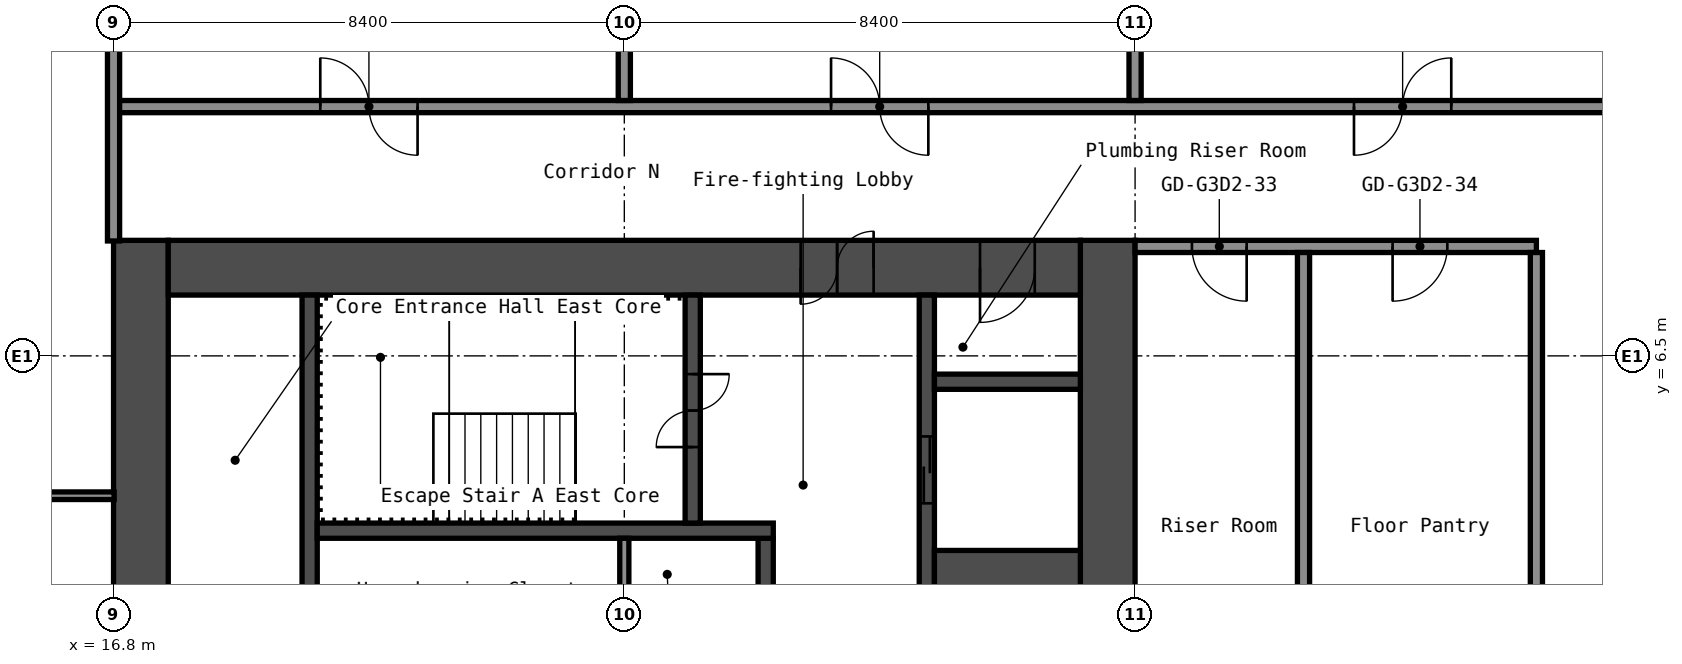
"""IFC4 building model, lengths in metres.
Left out: names, types, materials, properties, quantities, classifications, styles, units other than length and angle.
Written with IfcOpenShell. Run it as: python <this file> out.ifc"""

import sys

from ifc_helpers import new_model, si_unit, direction, frame, frame_2d, origin, place, context, subcontext, project, spatial, rectangle, extrude, element, fill, save


model = new_model("IFC4")
c1 = context("Model", 3, precision=1e-05, world=origin(), true_north=direction((0.0, 1.0)))
c2 = subcontext(c1, "Body", "Model", "MODEL_VIEW")
j1 = project(units=[si_unit("LENGTHUNIT", "METRE"), si_unit("PLANEANGLEUNIT", "RADIAN")], contexts=[c1])
p1 = place(None, origin())
s1 = spatial("IfcSite", under=j1, at=p1, CompositionType="ELEMENT")
p2 = place(p1, origin())
s2 = spatial("IfcBuilding", under=s1, at=p2, CompositionType="ELEMENT")
p3 = place(p2, frame((0.0, 0.0, 172.6)))
s3 = spatial("IfcBuildingStorey", under=s2, at=p3, CompositionType="ELEMENT", Elevation=172.6)
p4 = place(p3, frame((17.25, -8.4, 0.0), z_axis=(0.0, 0.0, 1.0), x_axis=(0.0, 1.0, 0.0)))
e1 = element("IfcWall", 1, at=p4, inside=s3, PredefinedType="SHEAR", context=c2, shape_type="SweptSolid", body=[
    extrude(rectangle(XDim=16.8, YDim=0.9, at=frame_2d((8.4, 0.0))), origin(), (0.0, 0.0, 1.0), 2.9),
])
p5 = place(p4, frame((7.1, 0.0, 0.0)))
e2 = element("IfcOpeningElement", 2, at=p5, cuts=e1, PredefinedType="OPENING", context=c2, shape_type="SweptSolid", body=[
    extrude(rectangle(XDim=1.6, YDim=2.1, at=frame_2d((0.8, 1.05))), frame((0.0, 0.46, 0.0), z_axis=(0.0, -1.0, 0.0), x_axis=(1.0, 0.0, 0.0)), (0.0, 0.0, 1.0), 0.92),
])
p6 = place(p3, frame((33.15, -8.4, 0.0), z_axis=(0.0, 0.0, 1.0), x_axis=(0.0, 1.0, 0.0)))
e3 = element("IfcWall", 3, at=p6, inside=s3, PredefinedType="SHEAR", context=c2, shape_type="SweptSolid", body=[
    extrude(rectangle(XDim=16.8, YDim=0.9, at=frame_2d((8.4, 0.0))), origin(), (0.0, 0.0, 1.0), 2.9),
])
p7 = place(p3, frame((17.7, 7.95, 0.0), z_axis=(0.0, 0.0, 1.0), x_axis=(1.0, 0.0, 0.0)))
e4 = element("IfcWall", 4, at=p7, inside=s3, PredefinedType="SHEAR", context=c2, shape_type="SweptSolid", body=[
    extrude(rectangle(XDim=15.0, YDim=0.9, at=frame_2d((7.5, 0.0))), origin(), (0.0, 0.0, 1.0), 2.9),
])
p8 = place(p7, frame((10.4, 0.0, 0.0)))
e5 = element("IfcOpeningElement", 5, at=p8, cuts=e4, PredefinedType="OPENING", context=c2, shape_type="SweptSolid", body=[
    extrude(rectangle(XDim=1.2, YDim=2.1, at=frame_2d((0.6, 1.05))), frame((0.0, 0.46, 0.0), z_axis=(0.0, -1.0, 0.0), x_axis=(1.0, 0.0, 0.0)), (0.0, 0.0, 1.0), 0.92),
])
p9 = place(p7, frame((13.35, 0.0, 0.0)))
e6 = element("IfcOpeningElement", 6, at=p9, cuts=e4, PredefinedType="OPENING", context=c2, shape_type="SweptSolid", body=[
    extrude(rectangle(XDim=0.9, YDim=2.1, at=frame_2d((0.45, 1.05))), frame((0.0, 0.46, 0.0), z_axis=(0.0, -1.0, 0.0), x_axis=(1.0, 0.0, 0.0)), (0.0, 0.0, 1.0), 0.92),
])
p10 = place(p3, frame((20.025, 1.2, 0.0), z_axis=(0.0, 0.0, 1.0), x_axis=(0.0, 1.0, 0.0)))
e7 = element("IfcWall", 7, at=p10, inside=s3, PredefinedType="SHEAR", context=c2, shape_type="SweptSolid", body=[
    extrude(rectangle(XDim=6.3, YDim=0.25, at=frame_2d((3.15, 0.0))), origin(), (0.0, 0.0, 1.0), 2.9),
])
p11 = place(p3, frame((27.525, 1.45, 0.0), z_axis=(0.0, 0.0, 1.0), x_axis=(0.0, 1.0, 0.0)))
e8 = element("IfcWall", 8, at=p11, inside=s3, PredefinedType="SHEAR", context=c2, shape_type="SweptSolid", body=[
    extrude(rectangle(XDim=2.05, YDim=0.25, at=frame_2d((1.025, 0.0))), origin(), (0.0, 0.0, 1.0), 2.9),
])
p12 = place(p3, frame((20.15, 3.625, 0.0), z_axis=(0.0, 0.0, 1.0), x_axis=(1.0, 0.0, 0.0)))
e9 = element("IfcWall", 9, at=p12, inside=s3, PredefinedType="SHEAR", context=c2, shape_type="SweptSolid", body=[
    extrude(rectangle(XDim=7.5, YDim=0.25, at=frame_2d((3.75, 0.0))), origin(), (0.0, 0.0, 1.0), 2.9),
])
p13 = place(p3, frame((26.325, 3.75, 0.0), z_axis=(0.0, 0.0, 1.0), x_axis=(0.0, 1.0, 0.0)))
e10 = element("IfcWall", 10, at=p13, inside=s3, PredefinedType="SHEAR", context=c2, shape_type="SweptSolid", body=[
    extrude(rectangle(XDim=3.75, YDim=0.25, at=frame_2d((1.875, 0.0))), origin(), (0.0, 0.0, 1.0), 2.9),
])
p14 = place(p13, frame((1.25, 0.0, 0.0)))
e11 = element("IfcOpeningElement", 11, at=p14, cuts=e10, PredefinedType="OPENING", context=c2, shape_type="SweptSolid", body=[
    extrude(rectangle(XDim=1.2, YDim=2.1, at=frame_2d((0.6, 1.05))), frame((0.0, 0.135, 0.0), z_axis=(0.0, -1.0, 0.0), x_axis=(1.0, 0.0, 0.0)), (0.0, 0.0, 1.0), 0.27),
])
p15 = place(p3, frame((30.175, 1.45, 0.0), z_axis=(0.0, 0.0, 1.0), x_axis=(0.0, 1.0, 0.0)))
e12 = element("IfcWall", 12, at=p15, inside=s3, PredefinedType="SHEAR", context=c2, shape_type="SweptSolid", body=[
    extrude(rectangle(XDim=6.05, YDim=0.25, at=frame_2d((3.025, 0.0))), origin(), (0.0, 0.0, 1.0), 2.9),
])
p16 = place(p15, frame((2.625, 0.0, 0.0)))
e13 = element("IfcOpeningElement", 13, at=p16, cuts=e12, PredefinedType="OPENING", context=c2, shape_type="SweptSolid", body=[
    extrude(rectangle(XDim=1.1, YDim=2.1, at=frame_2d((0.55, 1.05))), frame((0.0, 0.135, 0.0), z_axis=(0.0, -1.0, 0.0), x_axis=(1.0, 0.0, 0.0)), (0.0, 0.0, 1.0), 0.27),
])
p17 = place(p3, frame((30.3, 2.375, 0.0), z_axis=(0.0, 0.0, 1.0), x_axis=(1.0, 0.0, 0.0)))
e14 = element("IfcWall", 14, at=p17, inside=s3, PredefinedType="SHEAR", context=c2, shape_type="SweptSolid", body=[
    extrude(rectangle(XDim=2.4, YDim=1.85, at=frame_2d((1.2, 0.0))), origin(), (0.0, 0.0, 1.0), 2.9),
])
p18 = place(p3, frame((30.3, 6.075, 0.0), z_axis=(0.0, 0.0, 1.0), x_axis=(1.0, 0.0, 0.0)))
e15 = element("IfcWall", 15, at=p18, inside=s3, PredefinedType="SHEAR", context=c2, shape_type="SweptSolid", body=[
    extrude(rectangle(XDim=2.4, YDim=0.25, at=frame_2d((1.2, 0.0))), origin(), (0.0, 0.0, 1.0), 2.9),
])
p19 = place(p3, frame((25.2, 1.45, 0.0), z_axis=(0.0, 0.0, 1.0), x_axis=(0.0, 1.0, 0.0)))
e16 = element("IfcWall", 16, at=p19, inside=s3, PredefinedType="PARTITIONING", context=c2, shape_type="SweptSolid", body=[
    extrude(rectangle(XDim=2.05, YDim=0.15, at=frame_2d((1.025, 0.0))), origin(), (0.0, 0.0, 1.0), 2.9),
])
p20 = place(p3, frame((13.262, 4.2, 0.0), z_axis=(0.0, 0.0, 1.0), x_axis=(1.0, 0.0, 0.0)))
e17 = element("IfcWall", 17, at=p20, inside=s3, PredefinedType="PARTITIONING", context=c2, shape_type="SweptSolid", body=[
    extrude(rectangle(XDim=3.548, YDim=0.125, at=frame_2d((1.774, 0.0))), origin(), (0.0, 0.0, 1.0), 2.9),
])
p21 = place(p3, frame((33.6, 8.3, 0.0), z_axis=(0.0, 0.0, 1.0), x_axis=(1.0, 0.0, 0.0)))
e18 = element("IfcWall", 18, at=p21, inside=s3, PredefinedType="PARTITIONING", context=c2, shape_type="SweptSolid", body=[
    extrude(rectangle(XDim=6.6, YDim=0.2, at=frame_2d((3.3, 0.0))), origin(), (0.0, 0.0, 1.0), 2.9),
])
p22 = place(p21, frame((0.935, 0.0, 0.0)))
e19 = element("IfcOpeningElement", 19, at=p22, cuts=e18, PredefinedType="OPENING", context=c2, shape_type="SweptSolid", body=[
    extrude(rectangle(XDim=0.9, YDim=2.1, at=frame_2d((0.45, 1.05))), frame((0.0, 0.11, 0.0), z_axis=(0.0, -1.0, 0.0), x_axis=(1.0, 0.0, 0.0)), (0.0, 0.0, 1.0), 0.22),
])
p23 = place(p21, frame((4.235, 0.0, 0.0)))
e20 = element("IfcOpeningElement", 20, at=p23, cuts=e18, PredefinedType="OPENING", context=c2, shape_type="SweptSolid", body=[
    extrude(rectangle(XDim=0.9, YDim=2.1, at=frame_2d((0.45, 1.05))), frame((0.0, 0.11, 0.0), z_axis=(0.0, -1.0, 0.0), x_axis=(1.0, 0.0, 0.0)), (0.0, 0.0, 1.0), 0.22),
])
p24 = place(p3, frame((16.8, 10.6, 0.0), z_axis=(0.0, 0.0, 1.0), x_axis=(1.0, 0.0, 0.0)))
e21 = element("IfcWall", 21, at=p24, inside=s3, PredefinedType="PARTITIONING", context=c2, shape_type="SweptSolid", body=[
    extrude(rectangle(XDim=25.9, YDim=0.2, at=frame_2d((12.95, 0.0))), origin(), (0.0, 0.0, 1.0), 2.9),
])
p25 = place(p24, frame((3.4, 0.0, 0.0)))
e22 = element("IfcOpeningElement", 22, at=p25, cuts=e21, PredefinedType="OPENING", context=c2, shape_type="SweptSolid", body=[
    extrude(rectangle(XDim=1.6, YDim=2.1, at=frame_2d((0.8, 1.05))), frame((0.0, 0.11, 0.0), z_axis=(0.0, -1.0, 0.0), x_axis=(1.0, 0.0, 0.0)), (0.0, 0.0, 1.0), 0.22),
])
p26 = place(p24, frame((11.8, 0.0, 0.0)))
e23 = element("IfcOpeningElement", 23, at=p26, cuts=e21, PredefinedType="OPENING", context=c2, shape_type="SweptSolid", body=[
    extrude(rectangle(XDim=1.6, YDim=2.1, at=frame_2d((0.8, 1.05))), frame((0.0, 0.11, 0.0), z_axis=(0.0, -1.0, 0.0), x_axis=(1.0, 0.0, 0.0)), (0.0, 0.0, 1.0), 0.22),
])
p27 = place(p24, frame((20.4, 0.0, 0.0)))
e24 = element("IfcOpeningElement", 24, at=p27, cuts=e21, PredefinedType="OPENING", context=c2, shape_type="SweptSolid", body=[
    extrude(rectangle(XDim=1.6, YDim=2.1, at=frame_2d((0.8, 1.05))), frame((0.0, 0.11, 0.0), z_axis=(0.0, -1.0, 0.0), x_axis=(1.0, 0.0, 0.0)), (0.0, 0.0, 1.0), 0.22),
])
p28 = place(p3, frame((16.8, 8.39, 0.0), z_axis=(0.0, 0.0, 1.0), x_axis=(0.0, 1.0, 0.0)))
e25 = element("IfcWall", 25, at=p28, inside=s3, PredefinedType="PARTITIONING", context=c2, shape_type="SweptSolid", body=[
    extrude(rectangle(XDim=9.91, YDim=0.2, at=frame_2d((4.955, 0.0))), origin(), (0.0, 0.0, 1.0), 2.9),
])
for number, where, z_axis, x_axis in (
    (26, (25.2, 10.7, 0.0), (0.0, 0.0, 1.0), (0.0, 1.0, 0.0)),
    (27, (33.6, 10.7, 0.0), (0.0, 0.0, 1.0), (0.0, 1.0, 0.0)),
):
    element("IfcWall", number, at=place(p3, frame(where, z_axis=z_axis, x_axis=x_axis)), inside=s3, PredefinedType="PARTITIONING", context=c2, shape_type="SweptSolid", body=[
        extrude(rectangle(XDim=7.6, YDim=0.2, at=frame_2d((3.8, 0.0))), origin(), (0.0, 0.0, 1.0), 2.9),
    ])
p29 = place(p3, frame((36.37, 0.0, 0.0), z_axis=(0.0, 0.0, 1.0), x_axis=(0.0, 1.0, 0.0)))
e28 = element("IfcWall", 28, at=p29, inside=s3, PredefinedType="PARTITIONING", context=c2, shape_type="SweptSolid", body=[
    extrude(rectangle(XDim=8.2, YDim=0.2, at=frame_2d((4.1, 0.0))), origin(), (0.0, 0.0, 1.0), 2.9),
])
p30 = place(p3, frame((40.2, -8.2, 0.0), z_axis=(0.0, 0.0, 1.0), x_axis=(0.0, 1.0, 0.0)))
e29 = element("IfcWall", 29, at=p30, inside=s3, PredefinedType="PARTITIONING", context=c2, shape_type="SweptSolid", body=[
    extrude(rectangle(XDim=16.4, YDim=0.2, at=frame_2d((8.2, 0.0))), origin(), (0.0, 0.0, 1.0), 2.9),
])
p31 = place(p8, origin())
e30 = element("IfcDoor", 30, at=p31, inside=s3, OperationType="DOUBLE_DOOR_SINGLE_SWING", PredefinedType="DOOR", context=c2, shape_type="SweptSolid", body=[
    extrude(rectangle(XDim=1.2, YDim=2.1, at=frame_2d((0.6, 1.05))), frame((0.0, 0.025, 0.0), z_axis=(0.0, -1.0, 0.0), x_axis=(1.0, 0.0, 0.0)), (0.0, 0.0, 1.0), 0.05),
])
fill(e5, e30)
p32 = place(p9, origin())
e31 = element("IfcDoor", 31, at=p32, inside=s3, OperationType="SINGLE_SWING_LEFT", PredefinedType="DOOR", context=c2, shape_type="SweptSolid", body=[
    extrude(rectangle(XDim=0.9, YDim=2.1, at=frame_2d((0.45, 1.05))), frame((0.0, 0.025, 0.0), z_axis=(0.0, -1.0, 0.0), x_axis=(1.0, 0.0, 0.0)), (0.0, 0.0, 1.0), 0.05),
])
fill(e6, e31)
p33 = place(p14, origin())
e32 = element("IfcDoor", 32, at=p33, inside=s3, OperationType="DOUBLE_DOOR_SINGLE_SWING", PredefinedType="DOOR", context=c2, shape_type="SweptSolid", body=[
    extrude(rectangle(XDim=1.2, YDim=2.1, at=frame_2d((0.6, 1.05))), frame((0.0, 0.025, 0.0), z_axis=(0.0, -1.0, 0.0), x_axis=(1.0, 0.0, 0.0)), (0.0, 0.0, 1.0), 0.05),
])
fill(e11, e32)
p34 = place(p16, origin())
e33 = element("IfcDoor", 33, at=p34, inside=s3, OperationType="DOUBLE_DOOR_SLIDING", PredefinedType="DOOR", context=c2, shape_type="SweptSolid", body=[
    extrude(rectangle(XDim=1.1, YDim=2.1, at=frame_2d((0.55, 1.05))), frame((0.0, 0.025, 0.0), z_axis=(0.0, -1.0, 0.0), x_axis=(1.0, 0.0, 0.0)), (0.0, 0.0, 1.0), 0.05),
])
fill(e13, e33)
p35 = place(p22, origin())
e34 = element("IfcDoor", 34, at=p35, inside=s3, OperationType="SINGLE_SWING_RIGHT", PredefinedType="DOOR", context=c2, shape_type="SweptSolid", body=[
    extrude(rectangle(XDim=0.9, YDim=2.1, at=frame_2d((0.45, 1.05))), frame((0.0, 0.025, 0.0), z_axis=(0.0, -1.0, 0.0), x_axis=(1.0, 0.0, 0.0)), (0.0, 0.0, 1.0), 0.05),
])
fill(e19, e34)
p36 = place(p23, origin())
e35 = element("IfcDoor", 35, at=p36, inside=s3, OperationType="SINGLE_SWING_LEFT", PredefinedType="DOOR", context=c2, shape_type="SweptSolid", body=[
    extrude(rectangle(XDim=0.9, YDim=2.1, at=frame_2d((0.45, 1.05))), frame((0.0, 0.025, 0.0), z_axis=(0.0, -1.0, 0.0), x_axis=(1.0, 0.0, 0.0)), (0.0, 0.0, 1.0), 0.05),
])
fill(e20, e35)
p37 = place(p25, origin())
e36 = element("IfcDoor", 36, at=p37, inside=s3, OperationType="DOUBLE_DOOR_SINGLE_SWING", PredefinedType="DOOR", context=c2, shape_type="SweptSolid", body=[
    extrude(rectangle(XDim=1.6, YDim=2.1, at=frame_2d((0.8, 1.05))), frame((0.0, 0.025, 0.0), z_axis=(0.0, -1.0, 0.0), x_axis=(1.0, 0.0, 0.0)), (0.0, 0.0, 1.0), 0.05),
])
fill(e22, e36)
p38 = place(p26, origin())
e37 = element("IfcDoor", 37, at=p38, inside=s3, OperationType="DOUBLE_DOOR_SINGLE_SWING", PredefinedType="DOOR", context=c2, shape_type="SweptSolid", body=[
    extrude(rectangle(XDim=1.6, YDim=2.1, at=frame_2d((0.8, 1.05))), frame((0.0, 0.025, 0.0), z_axis=(0.0, -1.0, 0.0), x_axis=(1.0, 0.0, 0.0)), (0.0, 0.0, 1.0), 0.05),
])
fill(e23, e37)
p39 = place(p27, origin())
e38 = element("IfcDoor", 38, at=p39, inside=s3, OperationType="DOUBLE_DOOR_SINGLE_SWING", PredefinedType="DOOR", context=c2, shape_type="SweptSolid", body=[
    extrude(rectangle(XDim=1.6, YDim=2.1, at=frame_2d((0.8, 1.05))), frame((0.0, 0.025, 0.0), z_axis=(0.0, -1.0, 0.0), x_axis=(1.0, 0.0, 0.0)), (0.0, 0.0, 1.0), 0.05),
])
fill(e24, e38)
save(model, sys.argv[1])
